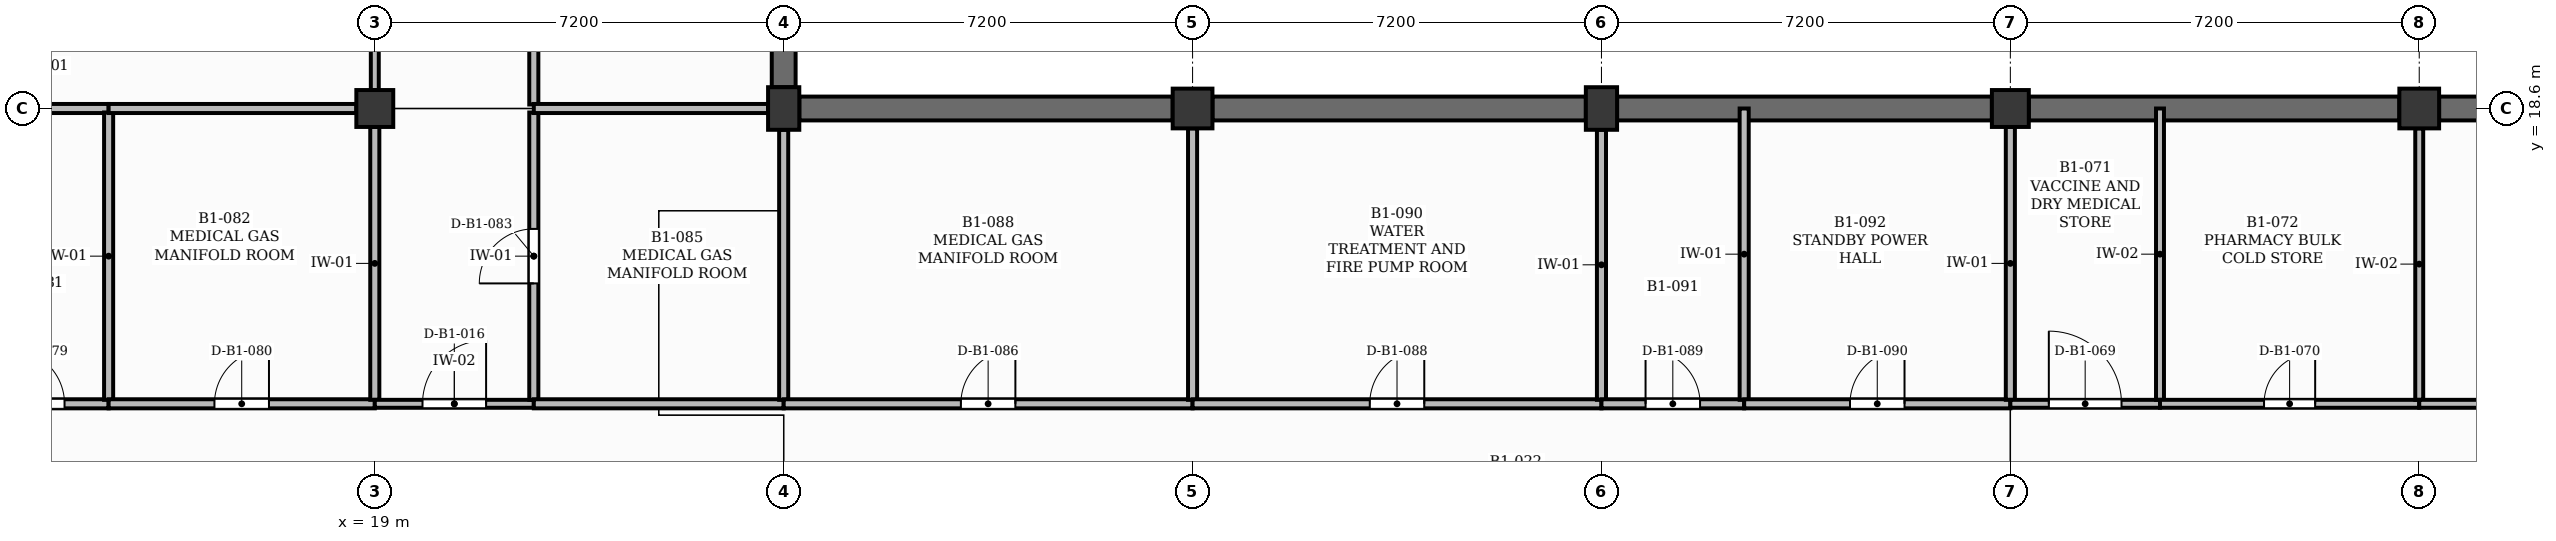
"""IFC4 building model, lengths in metres.
Left out: names, types, materials, properties, quantities, classifications, styles, units other than length and angle.
Written with IfcOpenShell. Run it as: python <this file> out.ifc"""

import sys

from ifc_helpers import new_model, si_unit, direction, frame, frame_2d, origin, origin_2d, place, context, subcontext, project, spatial, rectangle, extrude, element, fill, save


model = new_model("IFC4")
c1 = context("Model", 3, precision=1e-05, world=origin(), true_north=direction((0.0, 1.0)))
c2 = subcontext(c1, "Body", "Model", "MODEL_VIEW")
j1 = project(units=[si_unit("LENGTHUNIT", "METRE"), si_unit("PLANEANGLEUNIT", "RADIAN")], contexts=[c1])
p1 = place(None, origin())
s1 = spatial("IfcSite", under=j1, at=p1, CompositionType="ELEMENT")
p2 = place(p1, origin())
s2 = spatial("IfcBuilding", under=s1, at=p2, CompositionType="ELEMENT")
p3 = place(p2, frame((0.0, 0.0, -4.5)))
s3 = spatial("IfcBuildingStorey", under=s2, at=p3, CompositionType="ELEMENT", Elevation=-4.5)
p4 = place(p3, frame((19.0, 18.6, 0.0), z_axis=(0.0, 0.0, 1.0), x_axis=(1.0, 0.0, 0.0)))
e1 = element("IfcColumn", 1, at=p4, inside=s3, PredefinedType="COLUMN", context=c2, shape_type="SweptSolid", body=[
    extrude(rectangle(XDim=0.65, YDim=0.65, at=origin_2d()), origin(), (0.0, 0.0, 1.0), 4.2),
])
p5 = place(p3, frame((26.2, 18.6, 0.0), z_axis=(0.0, 0.0, 1.0), x_axis=(1.0, 0.0, 0.0)))
e2 = element("IfcColumn", 2, at=p5, inside=s3, PredefinedType="COLUMN", context=c2, shape_type="SweptSolid", body=[
    extrude(rectangle(XDim=0.55, YDim=0.75, at=origin_2d()), origin(), (0.0, 0.0, 1.0), 4.2),
])
p6 = place(p3, frame((33.4, 18.6, 0.0), z_axis=(0.0, 0.0, 1.0), x_axis=(1.0, 0.0, 0.0)))
e3 = element("IfcColumn", 3, at=p6, inside=s3, PredefinedType="COLUMN", context=c2, shape_type="SweptSolid", body=[
    extrude(rectangle(XDim=0.7, YDim=0.7, at=origin_2d()), origin(), (0.0, 0.0, 1.0), 4.2),
])
p7 = place(p3, frame((40.6, 18.6, 0.0), z_axis=(0.0, 0.0, 1.0), x_axis=(1.0, 0.0, 0.0)))
e4 = element("IfcColumn", 4, at=p7, inside=s3, PredefinedType="COLUMN", context=c2, shape_type="SweptSolid", body=[
    extrude(rectangle(XDim=0.55, YDim=0.75, at=origin_2d()), origin(), (0.0, 0.0, 1.0), 4.2),
])
p8 = place(p3, frame((47.8, 18.6, 0.0), z_axis=(0.0, 0.0, 1.0), x_axis=(1.0, 0.0, 0.0)))
e5 = element("IfcColumn", 5, at=p8, inside=s3, PredefinedType="COLUMN", context=c2, shape_type="SweptSolid", body=[
    extrude(rectangle(XDim=0.65, YDim=0.65, at=origin_2d()), origin(), (0.0, 0.0, 1.0), 4.2),
])
p9 = place(p3, frame((55.0, 18.6, 0.0), z_axis=(0.0, 0.0, 1.0), x_axis=(1.0, 0.0, 0.0)))
e6 = element("IfcColumn", 6, at=p9, inside=s3, PredefinedType="COLUMN", context=c2, shape_type="SweptSolid", body=[
    extrude(rectangle(XDim=0.7, YDim=0.7, at=origin_2d()), origin(), (0.0, 0.0, 1.0), 4.2),
])
p10 = place(p3, frame((26.2, 18.975, 0.0), z_axis=(0.0, 0.0, 1.0), x_axis=(0.0, 1.0, 0.0)))
e7 = element("IfcWall", 7, at=p10, inside=s3, PredefinedType="USERDEFINED", context=c2, shape_type="SweptSolid", body=[
    extrude(rectangle(XDim=7.875, YDim=0.42, at=frame_2d((3.938, 0.0))), origin(), (0.0, 0.0, 1.0), 4.2),
])
for number, where, z_axis, x_axis in (
    (8, (26.475, 18.6, 0.0), (0.0, 0.0, 1.0), (1.0, 0.0, 0.0)),
    (9, (33.75, 18.6, 0.0), (0.0, 0.0, 1.0), (1.0, 0.0, 0.0)),
):
    element("IfcWall", number, at=place(p3, frame(where, z_axis=z_axis, x_axis=x_axis)), inside=s3, PredefinedType="USERDEFINED", context=c2, shape_type="SweptSolid", body=[
        extrude(rectangle(XDim=6.575, YDim=0.42, at=frame_2d((3.288, 0.0))), origin(), (0.0, 0.0, 1.0), 4.2),
    ])
p11 = place(p3, frame((40.875, 18.6, 0.0), z_axis=(0.0, 0.0, 1.0), x_axis=(1.0, 0.0, 0.0)))
e10 = element("IfcWall", 10, at=p11, inside=s3, PredefinedType="USERDEFINED", context=c2, shape_type="SweptSolid", body=[
    extrude(rectangle(XDim=6.6, YDim=0.42, at=frame_2d((3.3, 0.0))), origin(), (0.0, 0.0, 1.0), 4.2),
])
for number, where, z_axis, x_axis in (
    (11, (48.125, 18.6, 0.0), (0.0, 0.0, 1.0), (1.0, 0.0, 0.0)),
    (12, (55.35, 18.6, 0.0), (0.0, 0.0, 1.0), (1.0, 0.0, 0.0)),
):
    element("IfcWall", number, at=place(p3, frame(where, z_axis=z_axis, x_axis=x_axis)), inside=s3, PredefinedType="USERDEFINED", context=c2, shape_type="SweptSolid", body=[
        extrude(rectangle(XDim=6.525, YDim=0.42, at=frame_2d((3.262, 0.0))), origin(), (0.0, 0.0, 1.0), 4.2),
    ])
p12 = place(p3, frame((11.8, 13.4, 0.0), z_axis=(0.0, 0.0, 1.0), x_axis=(1.0, 0.0, 0.0)))
e13 = element("IfcWall", 13, at=p12, inside=s3, PredefinedType="PARTITIONING", context=c2, shape_type="SweptSolid", body=[
    extrude(rectangle(XDim=2.513, YDim=0.16, at=frame_2d((1.256, 0.0))), origin(), (0.0, 0.0, 1.0), 4.08),
])
p13 = place(p12, frame((0.777, 0.0, 0.0)))
e14 = element("IfcOpeningElement", 14, at=p13, cuts=e13, PredefinedType="OPENING", context=c2, shape_type="SweptSolid", body=[
    extrude(rectangle(XDim=0.96, YDim=2.1, at=frame_2d((0.48, 1.05))), frame((0.0, 0.09, 0.0), z_axis=(0.0, -1.0, 0.0), x_axis=(1.0, 0.0, 0.0)), (0.0, 0.0, 1.0), 0.18),
])
p14 = place(p3, frame((12.15, 18.6, 0.0), z_axis=(0.0, 0.0, 1.0), x_axis=(1.0, 0.0, 0.0)))
e15 = element("IfcWall", 15, at=p14, inside=s3, PredefinedType="PARTITIONING", context=c2, shape_type="SweptSolid", body=[
    extrude(rectangle(XDim=2.163, YDim=0.16, at=frame_2d((1.082, 0.0))), origin(), (0.0, 0.0, 1.0), 3.5),
])
p15 = place(p3, frame((14.313, 13.47, 0.0), z_axis=(0.0, 0.0, 1.0), x_axis=(0.0, 1.0, 0.0)))
e16 = element("IfcWall", 16, at=p15, inside=s3, PredefinedType="PARTITIONING", context=c2, shape_type="SweptSolid", body=[
    extrude(rectangle(XDim=5.06, YDim=0.16, at=frame_2d((2.53, 0.0))), origin(), (0.0, 0.0, 1.0), 4.08),
])
p16 = place(p3, frame((14.313, 13.4, 0.0), z_axis=(0.0, 0.0, 1.0), x_axis=(1.0, 0.0, 0.0)))
e17 = element("IfcWall", 17, at=p16, inside=s3, PredefinedType="PARTITIONING", context=c2, shape_type="SweptSolid", body=[
    extrude(rectangle(XDim=4.687, YDim=0.16, at=frame_2d((2.344, 0.0))), origin(), (0.0, 0.0, 1.0), 4.08),
])
p17 = place(p16, frame((1.864, 0.0, 0.0)))
e18 = element("IfcOpeningElement", 18, at=p17, cuts=e17, PredefinedType="OPENING", context=c2, shape_type="SweptSolid", body=[
    extrude(rectangle(XDim=0.96, YDim=2.1, at=frame_2d((0.48, 1.05))), frame((0.0, 0.09, 0.0), z_axis=(0.0, -1.0, 0.0), x_axis=(1.0, 0.0, 0.0)), (0.0, 0.0, 1.0), 0.18),
])
p18 = place(p3, frame((14.313, 18.6, 0.0), z_axis=(0.0, 0.0, 1.0), x_axis=(1.0, 0.0, 0.0)))
e19 = element("IfcWall", 19, at=p18, inside=s3, PredefinedType="PARTITIONING", context=c2, shape_type="SweptSolid", body=[
    extrude(rectangle(XDim=4.362, YDim=0.16, at=frame_2d((2.181, 0.0))), origin(), (0.0, 0.0, 1.0), 3.5),
])
p19 = place(p3, frame((19.0, 13.47, 0.0), z_axis=(0.0, 0.0, 1.0), x_axis=(0.0, 1.0, 0.0)))
e20 = element("IfcWall", 20, at=p19, inside=s3, PredefinedType="PARTITIONING", context=c2, shape_type="SweptSolid", body=[
    extrude(rectangle(XDim=4.805, YDim=0.16, at=frame_2d((2.402, 0.0))), origin(), (0.0, 0.0, 1.0), 3.5),
])
p20 = place(p3, frame((19.0, 13.4, 0.0), z_axis=(0.0, 0.0, 1.0), x_axis=(1.0, 0.0, 0.0)))
e21 = element("IfcWall", 21, at=p20, inside=s3, PredefinedType="PARTITIONING", context=c2, shape_type="SweptSolid", body=[
    extrude(rectangle(XDim=2.8, YDim=0.14, at=frame_2d((1.4, 0.0))), origin(), (0.0, 0.0, 1.0), 4.08),
])
p21 = place(p20, frame((0.84, 0.0, 0.0)))
e22 = element("IfcOpeningElement", 22, at=p21, cuts=e21, PredefinedType="OPENING", context=c2, shape_type="SweptSolid", body=[
    extrude(rectangle(XDim=1.12, YDim=2.15, at=frame_2d((0.56, 1.075))), frame((0.0, 0.08, 0.0), z_axis=(0.0, -1.0, 0.0), x_axis=(1.0, 0.0, 0.0)), (0.0, 0.0, 1.0), 0.16),
])
p22 = place(p3, frame((19.0, 18.925, 0.0), z_axis=(0.0, 0.0, 1.0), x_axis=(0.0, 1.0, 0.0)))
e23 = element("IfcWall", 23, at=p22, inside=s3, PredefinedType="PARTITIONING", context=c2, shape_type="SweptSolid", body=[
    extrude(rectangle(XDim=7.95, YDim=0.14, at=frame_2d((3.975, 0.0))), origin(), (0.0, 0.0, 1.0), 3.5),
])
p23 = place(p3, frame((21.8, 13.47, 0.0), z_axis=(0.0, 0.0, 1.0), x_axis=(0.0, 1.0, 0.0)))
e24 = element("IfcWall", 24, at=p23, inside=s3, PredefinedType="PARTITIONING", context=c2, shape_type="SweptSolid", body=[
    extrude(rectangle(XDim=5.06, YDim=0.16, at=frame_2d((2.53, 0.0))), origin(), (0.0, 0.0, 1.0), 4.08),
])
p24 = place(p23, frame((2.05, 0.0, 0.0)))
e25 = element("IfcOpeningElement", 25, at=p24, cuts=e24, PredefinedType="OPENING", context=c2, shape_type="SweptSolid", body=[
    extrude(rectangle(XDim=0.96, YDim=2.1, at=frame_2d((0.48, 1.05))), frame((0.0, 0.09, 0.0), z_axis=(0.0, -1.0, 0.0), x_axis=(1.0, 0.0, 0.0)), (0.0, 0.0, 1.0), 0.18),
])
p25 = place(p3, frame((21.8, 13.4, 0.0), z_axis=(0.0, 0.0, 1.0), x_axis=(1.0, 0.0, 0.0)))
e26 = element("IfcWall", 26, at=p25, inside=s3, PredefinedType="PARTITIONING", context=c2, shape_type="SweptSolid", body=[
    extrude(rectangle(XDim=4.4, YDim=0.16, at=frame_2d((2.2, 0.0))), origin(), (0.0, 0.0, 1.0), 4.08),
])
p26 = place(p3, frame((21.8, 18.67, 0.0), z_axis=(0.0, 0.0, 1.0), x_axis=(0.0, 1.0, 0.0)))
e27 = element("IfcWall", 27, at=p26, inside=s3, PredefinedType="PARTITIONING", context=c2, shape_type="SweptSolid", body=[
    extrude(rectangle(XDim=8.46, YDim=0.16, at=frame_2d((4.23, 0.0))), origin(), (0.0, 0.0, 1.0), 4.08),
])
p27 = place(p26, frame((3.75, 0.0, 0.0)))
e28 = element("IfcOpeningElement", 28, at=p27, cuts=e27, PredefinedType="OPENING", context=c2, shape_type="SweptSolid", body=[
    extrude(rectangle(XDim=0.96, YDim=2.1, at=frame_2d((0.48, 1.05))), frame((0.0, 0.09, 0.0), z_axis=(0.0, -1.0, 0.0), x_axis=(1.0, 0.0, 0.0)), (0.0, 0.0, 1.0), 0.18),
])
p28 = place(p3, frame((21.8, 18.6, 0.0), z_axis=(0.0, 0.0, 1.0), x_axis=(1.0, 0.0, 0.0)))
e29 = element("IfcWall", 29, at=p28, inside=s3, PredefinedType="PARTITIONING", context=c2, shape_type="SweptSolid", body=[
    extrude(rectangle(XDim=4.125, YDim=0.16, at=frame_2d((2.062, 0.0))), origin(), (0.0, 0.0, 1.0), 3.5),
])
p29 = place(p3, frame((26.2, 13.47, 0.0), z_axis=(0.0, 0.0, 1.0), x_axis=(0.0, 1.0, 0.0)))
e30 = element("IfcWall", 30, at=p29, inside=s3, PredefinedType="PARTITIONING", context=c2, shape_type="SweptSolid", body=[
    extrude(rectangle(XDim=4.755, YDim=0.16, at=frame_2d((2.377, 0.0))), origin(), (0.0, 0.0, 1.0), 3.5),
])
p30 = place(p3, frame((26.2, 13.4, 0.0), z_axis=(0.0, 0.0, 1.0), x_axis=(1.0, 0.0, 0.0)))
e31 = element("IfcWall", 31, at=p30, inside=s3, PredefinedType="PARTITIONING", context=c2, shape_type="SweptSolid", body=[
    extrude(rectangle(XDim=7.2, YDim=0.16, at=frame_2d((3.6, 0.0))), origin(), (0.0, 0.0, 1.0), 4.08),
])
p31 = place(p30, frame((3.12, 0.0, 0.0)))
e32 = element("IfcOpeningElement", 32, at=p31, cuts=e31, PredefinedType="OPENING", context=c2, shape_type="SweptSolid", body=[
    extrude(rectangle(XDim=0.96, YDim=2.1, at=frame_2d((0.48, 1.05))), frame((0.0, 0.09, 0.0), z_axis=(0.0, -1.0, 0.0), x_axis=(1.0, 0.0, 0.0)), (0.0, 0.0, 1.0), 0.18),
])
p32 = place(p3, frame((33.4, 13.47, 0.0), z_axis=(0.0, 0.0, 1.0), x_axis=(0.0, 1.0, 0.0)))
e33 = element("IfcWall", 33, at=p32, inside=s3, PredefinedType="PARTITIONING", context=c2, shape_type="SweptSolid", body=[
    extrude(rectangle(XDim=4.78, YDim=0.16, at=frame_2d((2.39, 0.0))), origin(), (0.0, 0.0, 1.0), 3.5),
])
p33 = place(p3, frame((33.4, 13.4, 0.0), z_axis=(0.0, 0.0, 1.0), x_axis=(1.0, 0.0, 0.0)))
e34 = element("IfcWall", 34, at=p33, inside=s3, PredefinedType="PARTITIONING", context=c2, shape_type="SweptSolid", body=[
    extrude(rectangle(XDim=7.2, YDim=0.16, at=frame_2d((3.6, 0.0))), origin(), (0.0, 0.0, 1.0), 4.08),
])
p34 = place(p33, frame((3.12, 0.0, 0.0)))
e35 = element("IfcOpeningElement", 35, at=p34, cuts=e34, PredefinedType="OPENING", context=c2, shape_type="SweptSolid", body=[
    extrude(rectangle(XDim=0.96, YDim=2.1, at=frame_2d((0.48, 1.05))), frame((0.0, 0.09, 0.0), z_axis=(0.0, -1.0, 0.0), x_axis=(1.0, 0.0, 0.0)), (0.0, 0.0, 1.0), 0.18),
])
p35 = place(p3, frame((40.6, 13.47, 0.0), z_axis=(0.0, 0.0, 1.0), x_axis=(0.0, 1.0, 0.0)))
e36 = element("IfcWall", 36, at=p35, inside=s3, PredefinedType="PARTITIONING", context=c2, shape_type="SweptSolid", body=[
    extrude(rectangle(XDim=4.755, YDim=0.16, at=frame_2d((2.377, 0.0))), origin(), (0.0, 0.0, 1.0), 3.5),
])
p36 = place(p3, frame((40.6, 13.4, 0.0), z_axis=(0.0, 0.0, 1.0), x_axis=(1.0, 0.0, 0.0)))
e37 = element("IfcWall", 37, at=p36, inside=s3, PredefinedType="PARTITIONING", context=c2, shape_type="SweptSolid", body=[
    extrude(rectangle(XDim=2.513, YDim=0.16, at=frame_2d((1.256, 0.0))), origin(), (0.0, 0.0, 1.0), 4.08),
])
p37 = place(p36, frame((0.777, 0.0, 0.0)))
e38 = element("IfcOpeningElement", 38, at=p37, cuts=e37, PredefinedType="OPENING", context=c2, shape_type="SweptSolid", body=[
    extrude(rectangle(XDim=0.96, YDim=2.1, at=frame_2d((0.48, 1.05))), frame((0.0, 0.09, 0.0), z_axis=(0.0, -1.0, 0.0), x_axis=(1.0, 0.0, 0.0)), (0.0, 0.0, 1.0), 0.18),
])
p38 = place(p3, frame((43.113, 13.47, 0.0), z_axis=(0.0, 0.0, 1.0), x_axis=(0.0, 1.0, 0.0)))
e39 = element("IfcWall", 39, at=p38, inside=s3, PredefinedType="PARTITIONING", context=c2, shape_type="SweptSolid", body=[
    extrude(rectangle(XDim=5.13, YDim=0.16, at=frame_2d((2.565, 0.0))), origin(), (0.0, 0.0, 1.0), 4.08),
])
p39 = place(p3, frame((43.113, 13.4, 0.0), z_axis=(0.0, 0.0, 1.0), x_axis=(1.0, 0.0, 0.0)))
e40 = element("IfcWall", 40, at=p39, inside=s3, PredefinedType="PARTITIONING", context=c2, shape_type="SweptSolid", body=[
    extrude(rectangle(XDim=4.687, YDim=0.16, at=frame_2d((2.344, 0.0))), origin(), (0.0, 0.0, 1.0), 4.08),
])
p40 = place(p39, frame((1.864, 0.0, 0.0)))
e41 = element("IfcOpeningElement", 41, at=p40, cuts=e40, PredefinedType="OPENING", context=c2, shape_type="SweptSolid", body=[
    extrude(rectangle(XDim=0.96, YDim=2.1, at=frame_2d((0.48, 1.05))), frame((0.0, 0.09, 0.0), z_axis=(0.0, -1.0, 0.0), x_axis=(1.0, 0.0, 0.0)), (0.0, 0.0, 1.0), 0.18),
])
p41 = place(p3, frame((47.8, 13.47, 0.0), z_axis=(0.0, 0.0, 1.0), x_axis=(0.0, 1.0, 0.0)))
e42 = element("IfcWall", 42, at=p41, inside=s3, PredefinedType="PARTITIONING", context=c2, shape_type="SweptSolid", body=[
    extrude(rectangle(XDim=4.805, YDim=0.16, at=frame_2d((2.402, 0.0))), origin(), (0.0, 0.0, 1.0), 3.5),
])
p42 = place(p3, frame((47.8, 13.4, 0.0), z_axis=(0.0, 0.0, 1.0), x_axis=(1.0, 0.0, 0.0)))
e43 = element("IfcWall", 43, at=p42, inside=s3, PredefinedType="PARTITIONING", context=c2, shape_type="SweptSolid", body=[
    extrude(rectangle(XDim=2.635, YDim=0.14, at=frame_2d((1.317, 0.0))), origin(), (0.0, 0.0, 1.0), 4.08),
])
p43 = place(p42, frame((0.677, 0.0, 0.0)))
e44 = element("IfcOpeningElement", 44, at=p43, cuts=e43, PredefinedType="OPENING", context=c2, shape_type="SweptSolid", body=[
    extrude(rectangle(XDim=1.28, YDim=2.2, at=frame_2d((0.64, 1.1))), frame((0.0, 0.08, 0.0), z_axis=(0.0, -1.0, 0.0), x_axis=(1.0, 0.0, 0.0)), (0.0, 0.0, 1.0), 0.16),
])
p44 = place(p3, frame((50.435, 13.47, 0.0), z_axis=(0.0, 0.0, 1.0), x_axis=(0.0, 1.0, 0.0)))
e45 = element("IfcWall", 45, at=p44, inside=s3, PredefinedType="PARTITIONING", context=c2, shape_type="SweptSolid", body=[
    extrude(rectangle(XDim=5.13, YDim=0.14, at=frame_2d((2.565, 0.0))), origin(), (0.0, 0.0, 1.0), 4.08),
])
p45 = place(p3, frame((50.435, 13.4, 0.0), z_axis=(0.0, 0.0, 1.0), x_axis=(1.0, 0.0, 0.0)))
e46 = element("IfcWall", 46, at=p45, inside=s3, PredefinedType="PARTITIONING", context=c2, shape_type="SweptSolid", body=[
    extrude(rectangle(XDim=4.565, YDim=0.14, at=frame_2d((2.282, 0.0))), origin(), (0.0, 0.0, 1.0), 4.08),
])
p46 = place(p45, frame((1.833, 0.0, 0.0)))
e47 = element("IfcOpeningElement", 47, at=p46, cuts=e46, PredefinedType="OPENING", context=c2, shape_type="SweptSolid", body=[
    extrude(rectangle(XDim=0.9, YDim=2.1, at=frame_2d((0.45, 1.05))), frame((0.0, 0.08, 0.0), z_axis=(0.0, -1.0, 0.0), x_axis=(1.0, 0.0, 0.0)), (0.0, 0.0, 1.0), 0.16),
])
p47 = place(p3, frame((55.0, 13.47, 0.0), z_axis=(0.0, 0.0, 1.0), x_axis=(0.0, 1.0, 0.0)))
e48 = element("IfcWall", 48, at=p47, inside=s3, PredefinedType="PARTITIONING", context=c2, shape_type="SweptSolid", body=[
    extrude(rectangle(XDim=4.78, YDim=0.14, at=frame_2d((2.39, 0.0))), origin(), (0.0, 0.0, 1.0), 3.5),
])
p48 = place(p3, frame((55.0, 13.4, 0.0), z_axis=(0.0, 0.0, 1.0), x_axis=(1.0, 0.0, 0.0)))
e49 = element("IfcWall", 49, at=p48, inside=s3, PredefinedType="PARTITIONING", context=c2, shape_type="SweptSolid", body=[
    extrude(rectangle(XDim=7.05, YDim=0.14, at=frame_2d((3.525, 0.0))), origin(), (0.0, 0.0, 1.0), 4.08),
])
p49 = place(p48, frame((2.975, 0.0, 0.0)))
e50 = element("IfcOpeningElement", 50, at=p49, cuts=e49, PredefinedType="OPENING", context=c2, shape_type="SweptSolid", body=[
    extrude(rectangle(XDim=1.1, YDim=2.1, at=frame_2d((0.55, 1.05))), frame((0.0, 0.08, 0.0), z_axis=(0.0, -1.0, 0.0), x_axis=(1.0, 0.0, 0.0)), (0.0, 0.0, 1.0), 0.16),
])
p50 = place(p21, origin())
e51 = element("IfcDoor", 51, at=p50, inside=s3, OperationType="SINGLE_SWING_RIGHT", PredefinedType="DOOR", context=c2, shape_type="SweptSolid", body=[
    extrude(rectangle(XDim=1.12, YDim=2.15, at=frame_2d((0.56, 1.075))), frame((0.0, 0.025, 0.0), z_axis=(0.0, -1.0, 0.0), x_axis=(1.0, 0.0, 0.0)), (0.0, 0.0, 1.0), 0.05),
])
fill(e22, e51)
p51 = place(p43, origin())
e52 = element("IfcDoor", 52, at=p51, inside=s3, OperationType="SINGLE_SWING_LEFT", PredefinedType="DOOR", context=c2, shape_type="SweptSolid", body=[
    extrude(rectangle(XDim=1.28, YDim=2.2, at=frame_2d((0.64, 1.1))), frame((0.0, 0.025, 0.0), z_axis=(0.0, -1.0, 0.0), x_axis=(1.0, 0.0, 0.0)), (0.0, 0.0, 1.0), 0.05),
])
fill(e44, e52)
p52 = place(p46, origin())
e53 = element("IfcDoor", 53, at=p52, inside=s3, OperationType="SINGLE_SWING_RIGHT", PredefinedType="DOOR", context=c2, shape_type="SweptSolid", body=[
    extrude(rectangle(XDim=0.9, YDim=2.1, at=frame_2d((0.45, 1.05))), frame((0.0, 0.025, 0.0), z_axis=(0.0, -1.0, 0.0), x_axis=(1.0, 0.0, 0.0)), (0.0, 0.0, 1.0), 0.05),
])
fill(e47, e53)
p53 = place(p13, origin())
e54 = element("IfcDoor", 54, at=p53, inside=s3, OperationType="SINGLE_SWING_LEFT", PredefinedType="DOOR", context=c2, shape_type="SweptSolid", body=[
    extrude(rectangle(XDim=0.96, YDim=2.1, at=frame_2d((0.48, 1.05))), frame((0.0, 0.025, 0.0), z_axis=(0.0, -1.0, 0.0), x_axis=(1.0, 0.0, 0.0)), (0.0, 0.0, 1.0), 0.05),
])
fill(e14, e54)
p54 = place(p17, origin())
e55 = element("IfcDoor", 55, at=p54, inside=s3, OperationType="SINGLE_SWING_RIGHT", PredefinedType="DOOR", context=c2, shape_type="SweptSolid", body=[
    extrude(rectangle(XDim=0.96, YDim=2.1, at=frame_2d((0.48, 1.05))), frame((0.0, 0.025, 0.0), z_axis=(0.0, -1.0, 0.0), x_axis=(1.0, 0.0, 0.0)), (0.0, 0.0, 1.0), 0.05),
])
fill(e18, e55)
p55 = place(p24, origin())
e56 = element("IfcDoor", 56, at=p55, inside=s3, OperationType="SINGLE_SWING_LEFT", PredefinedType="DOOR", context=c2, shape_type="SweptSolid", body=[
    extrude(rectangle(XDim=0.96, YDim=2.1, at=frame_2d((0.48, 1.05))), frame((0.0, 0.025, 0.0), z_axis=(0.0, -1.0, 0.0), x_axis=(1.0, 0.0, 0.0)), (0.0, 0.0, 1.0), 0.05),
])
fill(e25, e56)
p56 = place(p31, origin())
e57 = element("IfcDoor", 57, at=p56, inside=s3, OperationType="SINGLE_SWING_RIGHT", PredefinedType="DOOR", context=c2, shape_type="SweptSolid", body=[
    extrude(rectangle(XDim=0.96, YDim=2.1, at=frame_2d((0.48, 1.05))), frame((0.0, 0.025, 0.0), z_axis=(0.0, -1.0, 0.0), x_axis=(1.0, 0.0, 0.0)), (0.0, 0.0, 1.0), 0.05),
])
fill(e32, e57)
p57 = place(p34, origin())
e58 = element("IfcDoor", 58, at=p57, inside=s3, OperationType="SINGLE_SWING_RIGHT", PredefinedType="DOOR", context=c2, shape_type="SweptSolid", body=[
    extrude(rectangle(XDim=0.96, YDim=2.1, at=frame_2d((0.48, 1.05))), frame((0.0, 0.025, 0.0), z_axis=(0.0, -1.0, 0.0), x_axis=(1.0, 0.0, 0.0)), (0.0, 0.0, 1.0), 0.05),
])
fill(e35, e58)
p58 = place(p37, origin())
e59 = element("IfcDoor", 59, at=p58, inside=s3, OperationType="SINGLE_SWING_LEFT", PredefinedType="DOOR", context=c2, shape_type="SweptSolid", body=[
    extrude(rectangle(XDim=0.96, YDim=2.1, at=frame_2d((0.48, 1.05))), frame((0.0, 0.025, 0.0), z_axis=(0.0, -1.0, 0.0), x_axis=(1.0, 0.0, 0.0)), (0.0, 0.0, 1.0), 0.05),
])
fill(e38, e59)
p59 = place(p40, origin())
e60 = element("IfcDoor", 60, at=p59, inside=s3, OperationType="SINGLE_SWING_RIGHT", PredefinedType="DOOR", context=c2, shape_type="SweptSolid", body=[
    extrude(rectangle(XDim=0.96, YDim=2.1, at=frame_2d((0.48, 1.05))), frame((0.0, 0.025, 0.0), z_axis=(0.0, -1.0, 0.0), x_axis=(1.0, 0.0, 0.0)), (0.0, 0.0, 1.0), 0.05),
])
fill(e41, e60)
save(model, sys.argv[1])
